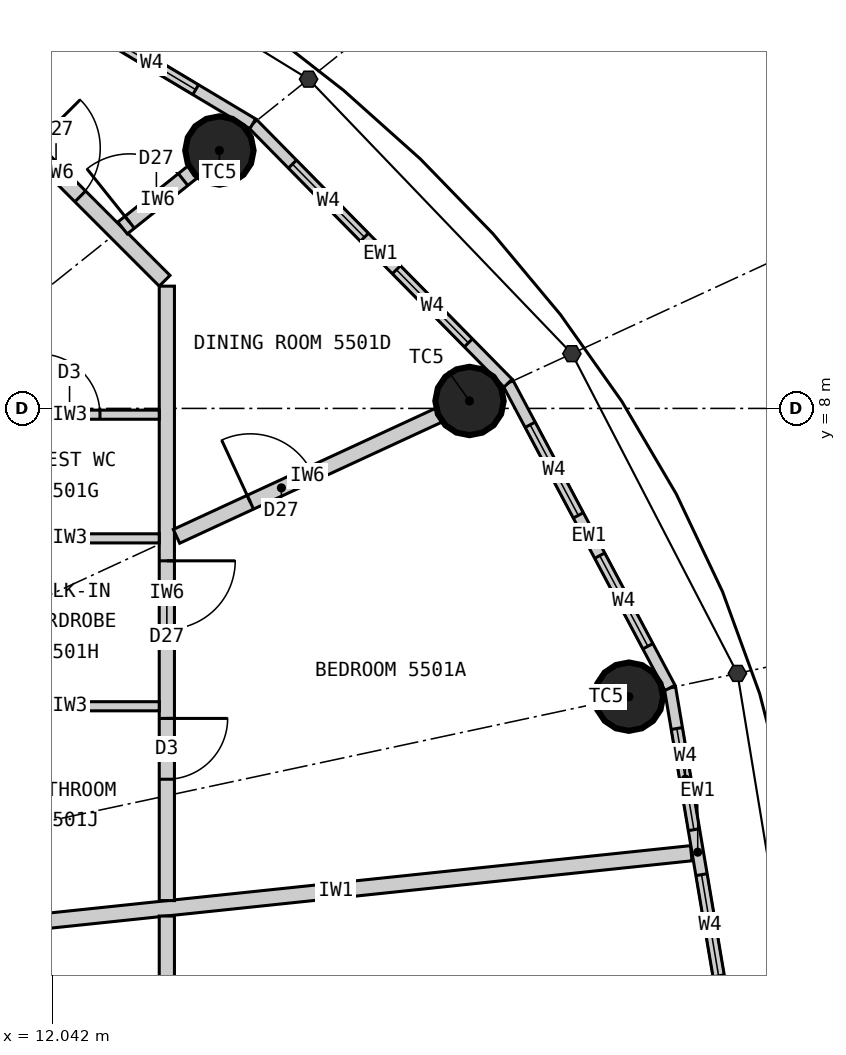
"""IFC4 building model, lengths in metres.
Left out: names, types, materials, properties, quantities, classifications, styles, units other than length and angle.
Written with IfcOpenShell. Run it as: python <this file> out.ifc"""

import sys

from ifc_helpers import new_model, si_unit, direction, frame, frame_2d, origin, origin_2d, place, context, subcontext, project, spatial, rectangle, circle, extrude, element, fill, save


model = new_model("IFC4")
c1 = context("Model", 3, precision=1e-05, world=origin(), true_north=direction((0.0, 1.0)))
c2 = subcontext(c1, "Body", "Model", "MODEL_VIEW")
j1 = project(units=[si_unit("LENGTHUNIT", "METRE"), si_unit("PLANEANGLEUNIT", "RADIAN")], contexts=[c1])
p1 = place(None, origin())
s1 = spatial("IfcSite", under=j1, at=p1, CompositionType="ELEMENT")
p2 = place(p1, origin())
s2 = spatial("IfcBuilding", under=s1, at=p2, CompositionType="ELEMENT")
p3 = place(p2, frame((0.0, 0.0, 206.1)))
s3 = spatial("IfcBuildingStorey", under=s2, at=p3, CompositionType="ELEMENT", Elevation=206.1)
for number, where, z_axis, x_axis in (
    (1, (19.629, 4.208, 0.0), (0.0, 0.0, 1.0), (1.0, 0.0, 0.0)),
    (2, (17.532, 8.098, 0.0), (0.0, 0.0, 1.0), (1.0, 0.0, 0.0)),
    (3, (14.241, 11.393, 0.0), (0.0, 0.0, 1.0), (1.0, 0.0, 0.0)),
):
    element("IfcColumn", number, at=place(p3, frame(where, z_axis=z_axis, x_axis=x_axis)), inside=s3, PredefinedType="COLUMN", context=c2, shape_type="SweptSolid", body=[
        extrude(circle(Radius=0.45, at=origin_2d()), origin(), (0.0, 0.0, 1.0), 3.3),
    ])
p4 = place(p3, frame((20.9, 0.0, 0.0), z_axis=(0.0, 0.0, 1.0), x_axis=(-0.166538513568, 0.986034950445, 0.0)))
e4 = element("IfcWall", 4, at=p4, inside=s3, PredefinedType="ELEMENTEDWALL", context=c2, shape_type="SweptSolid", body=[
    extrude(rectangle(XDim=4.385, YDim=0.15, at=frame_2d((2.192, 0.0))), origin(), (0.0, 0.0, 1.0), 3.12),
])
p5 = place(p4, frame((0.542, 0.0, 0.9)))
e5 = element("IfcOpeningElement", 5, at=p5, cuts=e4, PredefinedType="OPENING", context=c2, shape_type="SweptSolid", body=[
    extrude(rectangle(XDim=1.35, YDim=1.9, at=frame_2d((0.675, 0.95))), frame((0.0, 0.085, 0.0), z_axis=(0.0, -1.0, 0.0), x_axis=(1.0, 0.0, 0.0)), (0.0, 0.0, 1.0), 0.17),
])
p6 = place(p4, frame((2.492, 0.0, 0.9)))
e6 = element("IfcOpeningElement", 6, at=p6, cuts=e4, PredefinedType="OPENING", context=c2, shape_type="SweptSolid", body=[
    extrude(rectangle(XDim=1.35, YDim=1.9, at=frame_2d((0.675, 0.95))), frame((0.0, 0.085, 0.0), z_axis=(0.0, -1.0, 0.0), x_axis=(1.0, 0.0, 0.0)), (0.0, 0.0, 1.0), 0.17),
])
p7 = place(p3, frame((20.17, 4.323, 0.0), z_axis=(0.0, 0.0, 1.0), x_axis=(-0.469256152955, 0.883062094597, 0.0)))
e7 = element("IfcWall", 7, at=p7, inside=s3, PredefinedType="ELEMENTEDWALL", context=c2, shape_type="SweptSolid", body=[
    extrude(rectangle(XDim=4.539, YDim=0.15, at=frame_2d((2.27, 0.0))), origin(), (0.0, 0.0, 1.0), 3.12),
])
p8 = place(p7, frame((0.62, 0.0, 0.9)))
e8 = element("IfcOpeningElement", 8, at=p8, cuts=e7, PredefinedType="OPENING", context=c2, shape_type="SweptSolid", body=[
    extrude(rectangle(XDim=1.35, YDim=1.9, at=frame_2d((0.675, 0.95))), frame((0.0, 0.085, 0.0), z_axis=(0.0, -1.0, 0.0), x_axis=(1.0, 0.0, 0.0)), (0.0, 0.0, 1.0), 0.17),
])
p9 = place(p7, frame((2.57, 0.0, 0.9)))
e9 = element("IfcOpeningElement", 9, at=p9, cuts=e7, PredefinedType="OPENING", context=c2, shape_type="SweptSolid", body=[
    extrude(rectangle(XDim=1.35, YDim=1.9, at=frame_2d((0.675, 0.95))), frame((0.0, 0.085, 0.0), z_axis=(0.0, -1.0, 0.0), x_axis=(1.0, 0.0, 0.0)), (0.0, 0.0, 1.0), 0.17),
])
p10 = place(p3, frame((18.04, 8.332, 0.0), z_axis=(0.0, 0.0, 1.0), x_axis=(-0.701527379618, 0.712642501993, 0.0)))
e10 = element("IfcWall", 10, at=p10, inside=s3, PredefinedType="ELEMENTEDWALL", context=c2, shape_type="SweptSolid", body=[
    extrude(rectangle(XDim=4.788, YDim=0.15, at=frame_2d((2.394, 0.0))), origin(), (0.0, 0.0, 1.0), 3.12),
])
p11 = place(p10, frame((0.744, 0.0, 0.9)))
e11 = element("IfcOpeningElement", 11, at=p11, cuts=e10, PredefinedType="OPENING", context=c2, shape_type="SweptSolid", body=[
    extrude(rectangle(XDim=1.35, YDim=1.9, at=frame_2d((0.675, 0.95))), frame((0.0, 0.085, 0.0), z_axis=(0.0, -1.0, 0.0), x_axis=(1.0, 0.0, 0.0)), (0.0, 0.0, 1.0), 0.17),
])
p12 = place(p10, frame((2.694, 0.0, 0.9)))
e12 = element("IfcOpeningElement", 12, at=p12, cuts=e10, PredefinedType="OPENING", context=c2, shape_type="SweptSolid", body=[
    extrude(rectangle(XDim=1.35, YDim=1.9, at=frame_2d((0.675, 0.95))), frame((0.0, 0.085, 0.0), z_axis=(0.0, -1.0, 0.0), x_axis=(1.0, 0.0, 0.0)), (0.0, 0.0, 1.0), 0.17),
])
p13 = place(p3, frame((14.68, 11.744, 0.0), z_axis=(0.0, 0.0, 1.0), x_axis=(-0.85822150553, 0.513279502265, 0.0)))
e13 = element("IfcWall", 13, at=p13, inside=s3, PredefinedType="ELEMENTEDWALL", context=c2, shape_type="SweptSolid", body=[
    extrude(rectangle(XDim=5.05, YDim=0.15, at=frame_2d((2.525, 0.0))), origin(), (0.0, 0.0, 1.0), 3.12),
])
p14 = place(p13, frame((0.875, 0.0, 0.9)))
e14 = element("IfcOpeningElement", 14, at=p14, cuts=e13, PredefinedType="OPENING", context=c2, shape_type="SweptSolid", body=[
    extrude(rectangle(XDim=1.35, YDim=1.9, at=frame_2d((0.675, 0.95))), frame((0.0, 0.085, 0.0), z_axis=(0.0, -1.0, 0.0), x_axis=(1.0, 0.0, 0.0)), (0.0, 0.0, 1.0), 0.17),
])
p15 = place(p13, frame((2.825, 0.0, 0.9)))
e15 = element("IfcOpeningElement", 15, at=p15, cuts=e13, PredefinedType="OPENING", context=c2, shape_type="SweptSolid", body=[
    extrude(rectangle(XDim=1.35, YDim=1.9, at=frame_2d((0.675, 0.95))), frame((0.0, 0.085, 0.0), z_axis=(0.0, -1.0, 0.0), x_axis=(1.0, 0.0, 0.0)), (0.0, 0.0, 1.0), 0.17),
])
p16 = place(p3, frame((11.1, 1.166, 0.0), z_axis=(0.0, 0.0, 1.0), x_axis=(0.994527487125, 0.104475247564, 0.0)))
e16 = element("IfcWall", 16, at=p16, inside=s3, PredefinedType="PARTITIONING", context=c2, shape_type="SweptSolid", body=[
    extrude(rectangle(XDim=9.401, YDim=0.2, at=frame_2d((4.701, 0.0))), origin(), (0.0, 0.0, 1.0), 2.47),
])
p17 = place(p3, frame((13.55, 1.525, 0.0), z_axis=(0.0, 0.0, 1.0), x_axis=(0.0, 1.0, 0.0)))
e17 = element("IfcWall", 17, at=p17, inside=s3, PredefinedType="PARTITIONING", context=c2, shape_type="SweptSolid", body=[
    extrude(rectangle(XDim=8.084, YDim=0.2, at=frame_2d((4.042, 0.0))), origin(), (0.0, 0.0, 1.0), 3.12),
])
p18 = place(p17, frame((1.597, 0.0, 0.0)))
e18 = element("IfcOpeningElement", 18, at=p18, cuts=e17, PredefinedType="OPENING", context=c2, shape_type="SweptSolid", body=[
    extrude(rectangle(XDim=0.8, YDim=2.1, at=frame_2d((0.4, 1.05))), frame((0.0, 0.11, 0.0), z_axis=(0.0, -1.0, 0.0), x_axis=(1.0, 0.0, 0.0)), (0.0, 0.0, 1.0), 0.22),
])
p19 = place(p17, frame((3.57, 0.0, 0.0)))
e19 = element("IfcOpeningElement", 19, at=p19, cuts=e17, PredefinedType="OPENING", context=c2, shape_type="SweptSolid", body=[
    extrude(rectangle(XDim=0.9, YDim=2.1, at=frame_2d((0.45, 1.05))), frame((0.0, 0.11, 0.0), z_axis=(0.0, -1.0, 0.0), x_axis=(1.0, 0.0, 0.0)), (0.0, 0.0, 1.0), 0.22),
])
p20 = place(p3, frame((13.521, 9.679, 0.0), z_axis=(0.0, 0.0, 1.0), x_axis=(-0.707106781187, 0.707106781187, 0.0)))
e20 = element("IfcWall", 20, at=p20, inside=s3, PredefinedType="PARTITIONING", context=c2, shape_type="SweptSolid", body=[
    extrude(rectangle(XDim=4.019, YDim=0.2, at=frame_2d((2.009, 0.0))), origin(), (0.0, 0.0, 1.0), 3.12),
])
p21 = place(p20, frame((1.57, 0.0, 0.0)))
e21 = element("IfcOpeningElement", 21, at=p21, cuts=e20, PredefinedType="OPENING", context=c2, shape_type="SweptSolid", body=[
    extrude(rectangle(XDim=0.9, YDim=2.1, at=frame_2d((0.45, 1.05))), frame((0.0, 0.11, 0.0), z_axis=(0.0, -1.0, 0.0), x_axis=(1.0, 0.0, 0.0)), (0.0, 0.0, 1.0), 0.22),
])
p22 = place(p3, frame((13.677, 6.317, 0.0), z_axis=(0.0, 0.0, 1.0), x_axis=(0.907825704695, 0.419347695708, 0.0)))
e22 = element("IfcWall", 22, at=p22, inside=s3, PredefinedType="PARTITIONING", context=c2, shape_type="SweptSolid", body=[
    extrude(rectangle(XDim=3.796, YDim=0.2, at=frame_2d((1.898, 0.0))), origin(), (0.0, 0.0, 1.0), 2.32),
])
p23 = place(p22, frame((1.07, 0.0, 0.0)))
e23 = element("IfcOpeningElement", 23, at=p23, cuts=e22, PredefinedType="OPENING", context=c2, shape_type="SweptSolid", body=[
    extrude(rectangle(XDim=0.9, YDim=2.1, at=frame_2d((0.45, 1.05))), frame((0.0, 0.11, 0.0), z_axis=(0.0, -1.0, 0.0), x_axis=(1.0, 0.0, 0.0)), (0.0, 0.0, 1.0), 0.22),
])
p24 = place(p3, frame((12.968, 10.374, 0.0), z_axis=(0.0, 0.0, 1.0), x_axis=(0.780888968944, 0.624669847345, 0.0)))
e24 = element("IfcWall", 24, at=p24, inside=s3, PredefinedType="PARTITIONING", context=c2, shape_type="SweptSolid", body=[
    extrude(rectangle(XDim=1.181, YDim=0.2, at=frame_2d((0.591, 0.0))), origin(), (0.0, 0.0, 1.0), 2.42),
])
p25 = place(p24, frame((0.12, 0.0, 0.0)))
e25 = element("IfcOpeningElement", 25, at=p25, cuts=e24, PredefinedType="OPENING", context=c2, shape_type="SweptSolid", body=[
    extrude(rectangle(XDim=0.9, YDim=2.1, at=frame_2d((0.45, 1.05))), frame((0.0, 0.11, 0.0), z_axis=(0.0, -1.0, 0.0), x_axis=(1.0, 0.0, 0.0)), (0.0, 0.0, 1.0), 0.22),
])
for number, where, z_axis, x_axis in (
    (26, (11.1, 4.082, 0.0), (0.0, 0.0, 1.0), (1.0, 0.0, 0.0)),
    (27, (11.1, 6.29, 0.0), (0.0, 0.0, 1.0), (1.0, 0.0, 0.0)),
):
    element("IfcWall", number, at=place(p3, frame(where, z_axis=z_axis, x_axis=x_axis)), inside=s3, PredefinedType="PARTITIONING", context=c2, shape_type="SweptSolid", body=[
        extrude(rectangle(XDim=2.35, YDim=0.12, at=frame_2d((1.175, 0.0))), origin(), (0.0, 0.0, 1.0), 3.12),
    ])
p26 = place(p3, frame((11.1, 7.917, 0.0), z_axis=(0.0, 0.0, 1.0), x_axis=(1.0, 0.0, 0.0)))
e28 = element("IfcWall", 28, at=p26, inside=s3, PredefinedType="PARTITIONING", context=c2, shape_type="SweptSolid", body=[
    extrude(rectangle(XDim=2.35, YDim=0.12, at=frame_2d((1.175, 0.0))), origin(), (0.0, 0.0, 1.0), 3.12),
])
p27 = place(p26, frame((0.77, 0.0, 0.0)))
e29 = element("IfcOpeningElement", 29, at=p27, cuts=e28, PredefinedType="OPENING", context=c2, shape_type="SweptSolid", body=[
    extrude(rectangle(XDim=0.8, YDim=2.1, at=frame_2d((0.4, 1.05))), frame((0.0, 0.07, 0.0), z_axis=(0.0, -1.0, 0.0), x_axis=(1.0, 0.0, 0.0)), (0.0, 0.0, 1.0), 0.14),
])
p28 = place(p3, frame((13.55, -9.609, 0.0), z_axis=(0.0, 0.0, 1.0), x_axis=(0.0, 1.0, 0.0)))
e30 = element("IfcWall", 30, at=p28, inside=s3, PredefinedType="PARTITIONING", context=c2, shape_type="SweptSolid", body=[
    extrude(rectangle(XDim=10.93, YDim=0.2, at=frame_2d((5.465, 0.0))), origin(), (0.0, 0.0, 1.0), 3.12),
])
p29 = place(p28, frame((5.02, 0.0, 0.0)))
e31 = element("IfcOpeningElement", 31, at=p29, cuts=e30, PredefinedType="OPENING", context=c2, shape_type="SweptSolid", body=[
    extrude(rectangle(XDim=0.9, YDim=2.1, at=frame_2d((0.45, 1.05))), frame((0.0, 0.11, 0.0), z_axis=(0.0, -1.0, 0.0), x_axis=(1.0, 0.0, 0.0)), (0.0, 0.0, 1.0), 0.22),
])
p30 = place(p28, frame((6.877, 0.0, 0.0)))
e32 = element("IfcOpeningElement", 32, at=p30, cuts=e30, PredefinedType="OPENING", context=c2, shape_type="SweptSolid", body=[
    extrude(rectangle(XDim=0.9, YDim=2.1, at=frame_2d((0.45, 1.05))), frame((0.0, 0.11, 0.0), z_axis=(0.0, -1.0, 0.0), x_axis=(1.0, 0.0, 0.0)), (0.0, 0.0, 1.0), 0.22),
])
p31 = place(p28, frame((8.565, 0.0, 0.0)))
e33 = element("IfcOpeningElement", 33, at=p31, cuts=e30, PredefinedType="OPENING", context=c2, shape_type="SweptSolid", body=[
    extrude(rectangle(XDim=0.8, YDim=2.1, at=frame_2d((0.4, 1.05))), frame((0.0, 0.11, 0.0), z_axis=(0.0, -1.0, 0.0), x_axis=(1.0, 0.0, 0.0)), (0.0, 0.0, 1.0), 0.22),
])
p32 = place(p5, origin())
e34 = element("IfcWindow", 34, at=p32, inside=s3, PartitioningType="SINGLE_PANEL", PredefinedType="WINDOW", context=c2, shape_type="SweptSolid", body=[
    extrude(rectangle(XDim=1.35, YDim=1.9, at=frame_2d((0.675, 0.95))), frame((0.0, 0.03, 0.0), z_axis=(0.0, -1.0, 0.0), x_axis=(1.0, 0.0, 0.0)), (0.0, 0.0, 1.0), 0.06),
])
fill(e5, e34)
p33 = place(p6, origin())
e35 = element("IfcWindow", 35, at=p33, inside=s3, PartitioningType="SINGLE_PANEL", PredefinedType="WINDOW", context=c2, shape_type="SweptSolid", body=[
    extrude(rectangle(XDim=1.35, YDim=1.9, at=frame_2d((0.675, 0.95))), frame((0.0, 0.03, 0.0), z_axis=(0.0, -1.0, 0.0), x_axis=(1.0, 0.0, 0.0)), (0.0, 0.0, 1.0), 0.06),
])
fill(e6, e35)
p34 = place(p8, origin())
e36 = element("IfcWindow", 36, at=p34, inside=s3, PartitioningType="SINGLE_PANEL", PredefinedType="WINDOW", context=c2, shape_type="SweptSolid", body=[
    extrude(rectangle(XDim=1.35, YDim=1.9, at=frame_2d((0.675, 0.95))), frame((0.0, 0.03, 0.0), z_axis=(0.0, -1.0, 0.0), x_axis=(1.0, 0.0, 0.0)), (0.0, 0.0, 1.0), 0.06),
])
fill(e8, e36)
p35 = place(p9, origin())
e37 = element("IfcWindow", 37, at=p35, inside=s3, PartitioningType="SINGLE_PANEL", PredefinedType="WINDOW", context=c2, shape_type="SweptSolid", body=[
    extrude(rectangle(XDim=1.35, YDim=1.9, at=frame_2d((0.675, 0.95))), frame((0.0, 0.03, 0.0), z_axis=(0.0, -1.0, 0.0), x_axis=(1.0, 0.0, 0.0)), (0.0, 0.0, 1.0), 0.06),
])
fill(e9, e37)
p36 = place(p11, origin())
e38 = element("IfcWindow", 38, at=p36, inside=s3, PartitioningType="SINGLE_PANEL", PredefinedType="WINDOW", context=c2, shape_type="SweptSolid", body=[
    extrude(rectangle(XDim=1.35, YDim=1.9, at=frame_2d((0.675, 0.95))), frame((0.0, 0.03, 0.0), z_axis=(0.0, -1.0, 0.0), x_axis=(1.0, 0.0, 0.0)), (0.0, 0.0, 1.0), 0.06),
])
fill(e11, e38)
p37 = place(p12, origin())
e39 = element("IfcWindow", 39, at=p37, inside=s3, PartitioningType="SINGLE_PANEL", PredefinedType="WINDOW", context=c2, shape_type="SweptSolid", body=[
    extrude(rectangle(XDim=1.35, YDim=1.9, at=frame_2d((0.675, 0.95))), frame((0.0, 0.03, 0.0), z_axis=(0.0, -1.0, 0.0), x_axis=(1.0, 0.0, 0.0)), (0.0, 0.0, 1.0), 0.06),
])
fill(e12, e39)
p38 = place(p14, origin())
e40 = element("IfcWindow", 40, at=p38, inside=s3, PartitioningType="SINGLE_PANEL", PredefinedType="WINDOW", context=c2, shape_type="SweptSolid", body=[
    extrude(rectangle(XDim=1.35, YDim=1.9, at=frame_2d((0.675, 0.95))), frame((0.0, 0.03, 0.0), z_axis=(0.0, -1.0, 0.0), x_axis=(1.0, 0.0, 0.0)), (0.0, 0.0, 1.0), 0.06),
])
fill(e14, e40)
p39 = place(p18, origin())
e41 = element("IfcDoor", 41, at=p39, inside=s3, OperationType="SINGLE_SWING_RIGHT", PredefinedType="DOOR", context=c2, shape_type="SweptSolid", body=[
    extrude(rectangle(XDim=0.8, YDim=2.1, at=frame_2d((0.4, 1.05))), frame((0.0, 0.025, 0.0), z_axis=(0.0, -1.0, 0.0), x_axis=(1.0, 0.0, 0.0)), (0.0, 0.0, 1.0), 0.05),
])
fill(e18, e41)
p40 = place(p19, origin())
e42 = element("IfcDoor", 42, at=p40, inside=s3, OperationType="SINGLE_SWING_RIGHT", PredefinedType="DOOR", context=c2, shape_type="SweptSolid", body=[
    extrude(rectangle(XDim=0.9, YDim=2.1, at=frame_2d((0.45, 1.05))), frame((0.0, 0.025, 0.0), z_axis=(0.0, -1.0, 0.0), x_axis=(1.0, 0.0, 0.0)), (0.0, 0.0, 1.0), 0.05),
])
fill(e19, e42)
p41 = place(p27, origin())
e43 = element("IfcDoor", 43, at=p41, inside=s3, OperationType="SINGLE_SWING_LEFT", PredefinedType="DOOR", context=c2, shape_type="SweptSolid", body=[
    extrude(rectangle(XDim=0.8, YDim=2.1, at=frame_2d((0.4, 1.05))), frame((0.0, 0.025, 0.0), z_axis=(0.0, -1.0, 0.0), x_axis=(1.0, 0.0, 0.0)), (0.0, 0.0, 1.0), 0.05),
])
fill(e29, e43)
p42 = place(p21, origin())
e44 = element("IfcDoor", 44, at=p42, inside=s3, OperationType="SINGLE_SWING_RIGHT", PredefinedType="DOOR", context=c2, shape_type="SweptSolid", body=[
    extrude(rectangle(XDim=0.9, YDim=2.1, at=frame_2d((0.45, 1.05))), frame((0.0, 0.025, 0.0), z_axis=(0.0, -1.0, 0.0), x_axis=(1.0, 0.0, 0.0)), (0.0, 0.0, 1.0), 0.05),
])
fill(e21, e44)
p43 = place(p23, origin())
e45 = element("IfcDoor", 45, at=p43, inside=s3, OperationType="SINGLE_SWING_LEFT", PredefinedType="DOOR", context=c2, shape_type="SweptSolid", body=[
    extrude(rectangle(XDim=0.9, YDim=2.1, at=frame_2d((0.45, 1.05))), frame((0.0, 0.025, 0.0), z_axis=(0.0, -1.0, 0.0), x_axis=(1.0, 0.0, 0.0)), (0.0, 0.0, 1.0), 0.05),
])
fill(e23, e45)
p44 = place(p25, origin())
e46 = element("IfcDoor", 46, at=p44, inside=s3, OperationType="SINGLE_SWING_LEFT", PredefinedType="DOOR", context=c2, shape_type="SweptSolid", body=[
    extrude(rectangle(XDim=0.9, YDim=2.1, at=frame_2d((0.45, 1.05))), frame((0.0, 0.025, 0.0), z_axis=(0.0, -1.0, 0.0), x_axis=(1.0, 0.0, 0.0)), (0.0, 0.0, 1.0), 0.05),
])
fill(e25, e46)
save(model, sys.argv[1])
